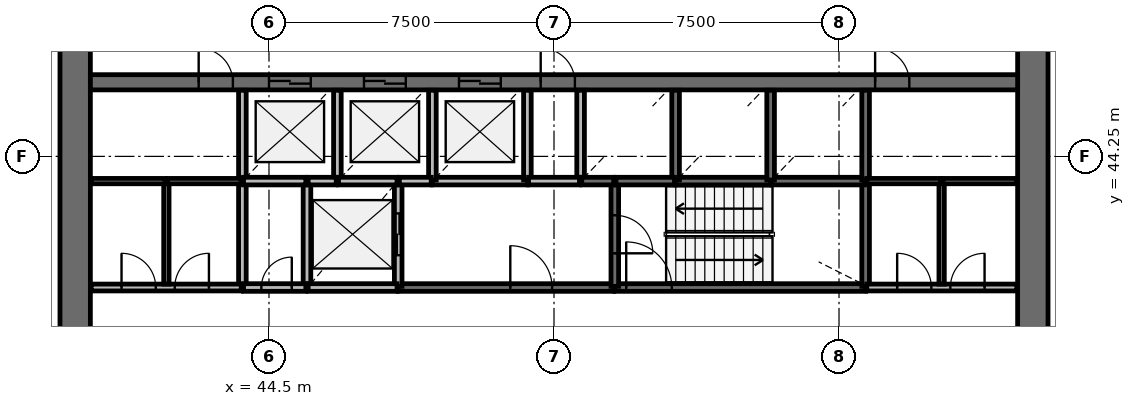
"""IFC4 building model, lengths in metres.
Left out: names, types, materials, properties, quantities, classifications, styles, units other than length and angle.
Written with IfcOpenShell. Run it as: python <this file> out.ifc"""

import sys

from ifc_helpers import new_model, si_unit, direction, frame, frame_2d, origin, place, context, subcontext, project, spatial, rectangle, extrude, source, transform, mapped, element, fill, save


model = new_model("IFC4")
c1 = context("Model", 3, precision=1e-05, world=origin(), true_north=direction((0.0, 1.0)))
c2 = subcontext(c1, "Body", "Model", "MODEL_VIEW")
j1 = project(units=[si_unit("LENGTHUNIT", "METRE"), si_unit("PLANEANGLEUNIT", "RADIAN")], contexts=[c1])
p1 = place(None, origin())
s1 = spatial("IfcSite", under=j1, at=p1, CompositionType="ELEMENT")
p2 = place(p1, origin())
s2 = spatial("IfcBuilding", under=s1, at=p2, CompositionType="ELEMENT")
p3 = place(p2, frame((0.0, 0.0, 116.7)))
s3 = spatial("IfcBuildingStorey", under=s2, at=p3, CompositionType="ELEMENT", Elevation=116.7)
p4 = place(p3, frame((64.6, 38.0, 0.0), z_axis=(0.0, 0.0, 1.0), x_axis=(0.0, 1.0, 0.0)))
e1 = element("IfcWall", 1, at=p4, inside=s3, PredefinedType="SHEAR", context=c2, shape_type="SweptSolid", body=[
    extrude(rectangle(XDim=20.0, YDim=0.8, at=frame_2d((10.0, 0.0))), origin(), (0.0, 0.0, 1.0), 4.1),
])
p5 = place(p4, frame((9.1, 0.0, 0.0)))
e2 = element("IfcOpeningElement", 2, at=p5, cuts=e1, PredefinedType="OPENING", context=c2, shape_type="SweptSolid", body=[
    extrude(rectangle(XDim=1.8, YDim=2.1, at=frame_2d((0.9, 1.05))), frame((0.0, 0.41, 0.0), z_axis=(0.0, -1.0, 0.0), x_axis=(1.0, 0.0, 0.0)), (0.0, 0.0, 1.0), 0.82),
])
p6 = place(p3, frame((39.4, 58.0, 0.0), z_axis=(0.0, 0.0, 1.0), x_axis=(0.0, -1.0, 0.0)))
e3 = element("IfcWall", 3, at=p6, inside=s3, PredefinedType="SHEAR", context=c2, shape_type="SweptSolid", body=[
    extrude(rectangle(XDim=20.0, YDim=0.8, at=frame_2d((10.0, 0.0))), origin(), (0.0, 0.0, 1.0), 4.1),
])
p7 = place(p6, frame((9.1, 0.0, 0.0)))
e4 = element("IfcOpeningElement", 4, at=p7, cuts=e3, PredefinedType="OPENING", context=c2, shape_type="SweptSolid", body=[
    extrude(rectangle(XDim=1.8, YDim=2.1, at=frame_2d((0.9, 1.05))), frame((0.0, 0.41, 0.0), z_axis=(0.0, -1.0, 0.0), x_axis=(1.0, 0.0, 0.0)), (0.0, 0.0, 1.0), 0.82),
])
p8 = place(p3, frame((39.8, 46.2, 0.0), z_axis=(0.0, 0.0, 1.0), x_axis=(1.0, 0.0, 0.0)))
e5 = element("IfcWall", 5, at=p8, inside=s3, PredefinedType="SHEAR", context=c2, shape_type="SweptSolid", body=[
    extrude(rectangle(XDim=24.4, YDim=0.4, at=frame_2d((12.2, 0.0))), origin(), (0.0, 0.0, 1.0), 4.1),
])
p9 = place(p8, frame((4.7, 0.0, 0.0)))
e6 = element("IfcOpeningElement", 6, at=p9, cuts=e5, PredefinedType="OPENING", context=c2, shape_type="SweptSolid", body=[
    extrude(rectangle(XDim=1.1, YDim=2.1, at=frame_2d((0.55, 1.05))), frame((0.0, 0.21, 0.0), z_axis=(0.0, -1.0, 0.0), x_axis=(1.0, 0.0, 0.0)), (0.0, 0.0, 1.0), 0.42),
])
p10 = place(p8, frame((7.2, 0.0, 0.0)))
e7 = element("IfcOpeningElement", 7, at=p10, cuts=e5, PredefinedType="OPENING", context=c2, shape_type="SweptSolid", body=[
    extrude(rectangle(XDim=1.1, YDim=2.1, at=frame_2d((0.55, 1.05))), frame((0.0, 0.21, 0.0), z_axis=(0.0, -1.0, 0.0), x_axis=(1.0, 0.0, 0.0)), (0.0, 0.0, 1.0), 0.42),
])
p11 = place(p8, frame((9.7, 0.0, 0.0)))
e8 = element("IfcOpeningElement", 8, at=p11, cuts=e5, PredefinedType="OPENING", context=c2, shape_type="SweptSolid", body=[
    extrude(rectangle(XDim=1.1, YDim=2.1, at=frame_2d((0.55, 1.05))), frame((0.0, 0.21, 0.0), z_axis=(0.0, -1.0, 0.0), x_axis=(1.0, 0.0, 0.0)), (0.0, 0.0, 1.0), 0.42),
])
p12 = place(p8, frame((20.65, 0.0, 0.0)))
e9 = element("IfcOpeningElement", 9, at=p12, cuts=e5, PredefinedType="OPENING", context=c2, shape_type="SweptSolid", body=[
    extrude(rectangle(XDim=0.9, YDim=2.1, at=frame_2d((0.45, 1.05))), frame((0.0, 0.21, 0.0), z_axis=(0.0, -1.0, 0.0), x_axis=(1.0, 0.0, 0.0)), (0.0, 0.0, 1.0), 0.42),
])
p13 = place(p8, frame((2.85, 0.0, 0.0)))
e10 = element("IfcOpeningElement", 10, at=p13, cuts=e5, PredefinedType="OPENING", context=c2, shape_type="SweptSolid", body=[
    extrude(rectangle(XDim=0.9, YDim=2.1, at=frame_2d((0.45, 1.05))), frame((0.0, 0.21, 0.0), z_axis=(0.0, -1.0, 0.0), x_axis=(1.0, 0.0, 0.0)), (0.0, 0.0, 1.0), 0.42),
])
p14 = place(p8, frame((11.85, 0.0, 0.0)))
e11 = element("IfcOpeningElement", 11, at=p14, cuts=e5, PredefinedType="OPENING", context=c2, shape_type="SweptSolid", body=[
    extrude(rectangle(XDim=0.9, YDim=2.1, at=frame_2d((0.45, 1.05))), frame((0.0, 0.21, 0.0), z_axis=(0.0, -1.0, 0.0), x_axis=(1.0, 0.0, 0.0)), (0.0, 0.0, 1.0), 0.42),
])
p15 = place(p3, frame((53.6, 40.8, 0.0), z_axis=(0.0, 0.0, 1.0), x_axis=(1.0, 0.0, 0.0)))
e12 = element("IfcWall", 12, at=p15, inside=s3, PredefinedType="SOLIDWALL", context=c2, shape_type="SweptSolid", body=[
    extrude(rectangle(XDim=6.6, YDim=0.2, at=frame_2d((3.3, 0.0))), origin(), (0.0, 0.0, 1.0), 3.7),
])
p16 = place(p15, frame((0.3, 0.0, 0.0)))
e13 = element("IfcOpeningElement", 13, at=p16, cuts=e12, PredefinedType="OPENING", context=c2, shape_type="SweptSolid", body=[
    extrude(rectangle(XDim=1.2, YDim=2.1, at=frame_2d((0.6, 1.05))), frame((0.0, 0.11, 0.0), z_axis=(0.0, -1.0, 0.0), x_axis=(1.0, 0.0, 0.0)), (0.0, 0.0, 1.0), 0.22),
])
p17 = place(p3, frame((47.9, 40.8, 0.0), z_axis=(0.0, 0.0, 1.0), x_axis=(1.0, 0.0, 0.0)))
e14 = element("IfcWall", 14, at=p17, inside=s3, PredefinedType="SOLIDWALL", context=c2, shape_type="SweptSolid", body=[
    extrude(rectangle(XDim=5.67, YDim=0.2, at=frame_2d((2.835, 0.0))), origin(), (0.0, 0.0, 1.0), 3.7),
])
p18 = place(p17, frame((2.95, 0.0, 0.0)))
e15 = element("IfcOpeningElement", 15, at=p18, cuts=e14, PredefinedType="OPENING", context=c2, shape_type="SweptSolid", body=[
    extrude(rectangle(XDim=1.1, YDim=2.1, at=frame_2d((0.55, 1.05))), frame((0.0, 0.11, 0.0), z_axis=(0.0, -1.0, 0.0), x_axis=(1.0, 0.0, 0.0)), (0.0, 0.0, 1.0), 0.22),
])
for number, where, z_axis, x_axis in (
    (16, (43.8, 43.6, 0.0), (0.0, 0.0, 1.0), (0.0, -1.0, 0.0)),
    (17, (45.5, 43.6, 0.0), (0.0, 0.0, 1.0), (0.0, -1.0, 0.0)),
):
    element("IfcWall", number, at=place(p3, frame(where, z_axis=z_axis, x_axis=x_axis)), inside=s3, PredefinedType="SOLIDWALL", context=c2, shape_type="SweptSolid", body=[
        extrude(rectangle(XDim=2.8, YDim=0.2, at=frame_2d((1.4, 0.0))), origin(), (0.0, 0.0, 1.0), 3.7),
    ])
p19 = place(p3, frame((47.9, 40.83, 0.0), z_axis=(0.0, 0.0, 1.0), x_axis=(0.0, 1.0, 0.0)))
e18 = element("IfcWall", 18, at=p19, inside=s3, PredefinedType="SOLIDWALL", context=c2, shape_type="SweptSolid", body=[
    extrude(rectangle(XDim=2.77, YDim=0.2, at=frame_2d((1.385, 0.0))), origin(), (0.0, 0.0, 1.0), 3.7),
])
p20 = place(p19, frame((0.82, 0.0, 0.0)))
e19 = element("IfcOpeningElement", 19, at=p20, cuts=e18, PredefinedType="OPENING", context=c2, shape_type="SweptSolid", body=[
    extrude(rectangle(XDim=1.1, YDim=2.1, at=frame_2d((0.55, 1.05))), frame((0.0, 0.11, 0.0), z_axis=(0.0, -1.0, 0.0), x_axis=(1.0, 0.0, 0.0)), (0.0, 0.0, 1.0), 0.22),
])
p21 = place(p3, frame((60.2, 40.83, 0.0), z_axis=(0.0, 0.0, 1.0), x_axis=(0.0, 1.0, 0.0)))
e20 = element("IfcWall", 20, at=p21, inside=s3, PredefinedType="SOLIDWALL", context=c2, shape_type="SweptSolid", body=[
    extrude(rectangle(XDim=2.77, YDim=0.2, at=frame_2d((1.385, 0.0))), origin(), (0.0, 0.0, 1.0), 3.7),
])
p22 = place(p3, frame((53.6, 43.6, 0.0), z_axis=(0.0, 0.0, 1.0), x_axis=(0.0, -1.0, 0.0)))
e21 = element("IfcWall", 21, at=p22, inside=s3, PredefinedType="SOLIDWALL", context=c2, shape_type="SweptSolid", body=[
    extrude(rectangle(XDim=2.77, YDim=0.2, at=frame_2d((1.385, 0.0))), origin(), (0.0, 0.0, 1.0), 3.7),
])
p23 = place(p22, frame((0.9, 0.0, 0.0)))
e22 = element("IfcOpeningElement", 22, at=p23, cuts=e21, PredefinedType="OPENING", context=c2, shape_type="SweptSolid", body=[
    extrude(rectangle(XDim=1.0, YDim=2.1, at=frame_2d((0.5, 1.05))), frame((0.0, 0.11, 0.0), z_axis=(0.0, -1.0, 0.0), x_axis=(1.0, 0.0, 0.0)), (0.0, 0.0, 1.0), 0.22),
])
for number, where, z_axis, x_axis in (
    (23, (48.8, 43.6, 0.0), (0.0, 0.0, 1.0), (1.0, 0.0, 0.0)),
    (24, (55.2, 43.6, 0.0), (0.0, 0.0, 1.0), (1.0, 0.0, 0.0)),
):
    element("IfcWall", number, at=place(p3, frame(where, z_axis=z_axis, x_axis=x_axis)), inside=s3, PredefinedType="SOLIDWALL", context=c2, shape_type="SweptSolid", body=[
        extrude(rectangle(XDim=2.5, YDim=0.2, at=frame_2d((1.25, 0.0))), origin(), (0.0, 0.0, 1.0), 3.7),
    ])
p24 = place(p3, frame((57.73, 43.6, 0.0), z_axis=(0.0, 0.0, 1.0), x_axis=(1.0, 0.0, 0.0)))
e25 = element("IfcWall", 25, at=p24, inside=s3, PredefinedType="SOLIDWALL", context=c2, shape_type="SweptSolid", body=[
    extrude(rectangle(XDim=2.44, YDim=0.2, at=frame_2d((1.22, 0.0))), origin(), (0.0, 0.0, 1.0), 3.7),
])
p25 = place(p3, frame((45.53, 40.8, 0.0), z_axis=(0.0, 0.0, 1.0), x_axis=(1.0, 0.0, 0.0)))
e26 = element("IfcWall", 26, at=p25, inside=s3, PredefinedType="SOLIDWALL", context=c2, shape_type="SweptSolid", body=[
    extrude(rectangle(XDim=2.34, YDim=0.2, at=frame_2d((1.17, 0.0))), origin(), (0.0, 0.0, 1.0), 3.7),
])
p26 = place(p3, frame((43.8, 45.99, 0.0), z_axis=(0.0, 0.0, 1.0), x_axis=(0.0, -1.0, 0.0)))
e27 = element("IfcWall", 27, at=p26, inside=s3, PredefinedType="SOLIDWALL", context=c2, shape_type="SweptSolid", body=[
    extrude(rectangle(XDim=2.36, YDim=0.2, at=frame_2d((1.18, 0.0))), origin(), (0.0, 0.0, 1.0), 3.7),
])
p27 = place(p3, frame((46.3, 43.6, 0.0), z_axis=(0.0, 0.0, 1.0), x_axis=(0.0, 1.0, 0.0)))
e28 = element("IfcWall", 28, at=p27, inside=s3, PredefinedType="SOLIDWALL", context=c2, shape_type="SweptSolid", body=[
    extrude(rectangle(XDim=2.39, YDim=0.2, at=frame_2d((1.195, 0.0))), origin(), (0.0, 0.0, 1.0), 3.7),
])
for number, where, z_axis, x_axis in (
    (29, (48.8, 43.63, 0.0), (0.0, 0.0, 1.0), (0.0, 1.0, 0.0)),
    (30, (51.3, 43.63, 0.0), (0.0, 0.0, 1.0), (0.0, 1.0, 0.0)),
):
    element("IfcWall", number, at=place(p3, frame(where, z_axis=z_axis, x_axis=x_axis)), inside=s3, PredefinedType="SOLIDWALL", context=c2, shape_type="SweptSolid", body=[
        extrude(rectangle(XDim=2.36, YDim=0.2, at=frame_2d((1.18, 0.0))), origin(), (0.0, 0.0, 1.0), 3.7),
    ])
p28 = place(p3, frame((52.7, 45.99, 0.0), z_axis=(0.0, 0.0, 1.0), x_axis=(0.0, -1.0, 0.0)))
e31 = element("IfcWall", 31, at=p28, inside=s3, PredefinedType="SOLIDWALL", context=c2, shape_type="SweptSolid", body=[
    extrude(rectangle(XDim=2.39, YDim=0.2, at=frame_2d((1.195, 0.0))), origin(), (0.0, 0.0, 1.0), 3.7),
])
for number, where, z_axis, x_axis in (
    (32, (55.2, 43.63, 0.0), (0.0, 0.0, 1.0), (0.0, 1.0, 0.0)),
    (33, (57.7, 43.63, 0.0), (0.0, 0.0, 1.0), (0.0, 1.0, 0.0)),
    (34, (60.2, 43.63, 0.0), (0.0, 0.0, 1.0), (0.0, 1.0, 0.0)),
):
    element("IfcWall", number, at=place(p3, frame(where, z_axis=z_axis, x_axis=x_axis)), inside=s3, PredefinedType="SOLIDWALL", context=c2, shape_type="SweptSolid", body=[
        extrude(rectangle(XDim=2.36, YDim=0.2, at=frame_2d((1.18, 0.0))), origin(), (0.0, 0.0, 1.0), 3.7),
    ])
p29 = place(p3, frame((43.83, 43.6, 0.0), z_axis=(0.0, 0.0, 1.0), x_axis=(1.0, 0.0, 0.0)))
e35 = element("IfcWall", 35, at=p29, inside=s3, PredefinedType="SOLIDWALL", context=c2, shape_type="SweptSolid", body=[
    extrude(rectangle(XDim=1.64, YDim=0.2, at=frame_2d((0.82, 0.0))), origin(), (0.0, 0.0, 1.0), 3.7),
])
p30 = place(p3, frame((43.83, 40.8, 0.0), z_axis=(0.0, 0.0, 1.0), x_axis=(1.0, 0.0, 0.0)))
e36 = element("IfcWall", 36, at=p30, inside=s3, PredefinedType="SOLIDWALL", context=c2, shape_type="SweptSolid", body=[
    extrude(rectangle(XDim=1.64, YDim=0.2, at=frame_2d((0.82, 0.0))), origin(), (0.0, 0.0, 1.0), 3.7),
])
p31 = place(p30, frame((0.47, 0.0, 0.0)))
e37 = element("IfcOpeningElement", 37, at=p31, cuts=e36, PredefinedType="OPENING", context=c2, shape_type="SweptSolid", body=[
    extrude(rectangle(XDim=0.8, YDim=2.1, at=frame_2d((0.4, 1.05))), frame((0.0, 0.11, 0.0), z_axis=(0.0, -1.0, 0.0), x_axis=(1.0, 0.0, 0.0)), (0.0, 0.0, 1.0), 0.22),
])
for number, where, z_axis, x_axis in (
    (38, (46.33, 43.6, 0.0), (0.0, 0.0, 1.0), (1.0, 0.0, 0.0)),
    (39, (53.63, 43.6, 0.0), (0.0, 0.0, 1.0), (1.0, 0.0, 0.0)),
):
    element("IfcWall", number, at=place(p3, frame(where, z_axis=z_axis, x_axis=x_axis)), inside=s3, PredefinedType="SOLIDWALL", context=c2, shape_type="SweptSolid", body=[
        extrude(rectangle(XDim=1.54, YDim=0.2, at=frame_2d((0.77, 0.0))), origin(), (0.0, 0.0, 1.0), 3.7),
    ])
p32 = place(p3, frame((52.67, 43.6, 0.0), z_axis=(0.0, 0.0, 1.0), x_axis=(-1.0, 0.0, 0.0)))
e40 = element("IfcWall", 40, at=p32, inside=s3, PredefinedType="SOLIDWALL", context=c2, shape_type="SweptSolid", body=[
    extrude(rectangle(XDim=1.34, YDim=0.2, at=frame_2d((0.67, 0.0))), origin(), (0.0, 0.0, 1.0), 3.7),
])
for number, where, z_axis, x_axis in (
    (41, (47.93, 43.6, 0.0), (0.0, 0.0, 1.0), (1.0, 0.0, 0.0)),
    (42, (52.73, 43.6, 0.0), (0.0, 0.0, 1.0), (1.0, 0.0, 0.0)),
):
    element("IfcWall", number, at=place(p3, frame(where, z_axis=z_axis, x_axis=x_axis)), inside=s3, PredefinedType="SOLIDWALL", context=c2, shape_type="SweptSolid", body=[
        extrude(rectangle(XDim=0.84, YDim=0.2, at=frame_2d((0.42, 0.0))), origin(), (0.0, 0.0, 1.0), 3.7),
    ])
p33 = place(p3, frame((45.53, 43.6, 0.0), z_axis=(0.0, 0.0, 1.0), x_axis=(1.0, 0.0, 0.0)))
e43 = element("IfcWall", 43, at=p33, inside=s3, PredefinedType="SOLIDWALL", context=c2, shape_type="SweptSolid", body=[
    extrude(rectangle(XDim=0.74, YDim=0.2, at=frame_2d((0.37, 0.0))), origin(), (0.0, 0.0, 1.0), 3.7),
])
p34 = place(p3, frame((60.23, 40.8, 0.0), z_axis=(0.0, 0.0, 1.0), x_axis=(1.0, 0.0, 0.0)))
e44 = element("IfcWall", 44, at=p34, inside=s3, PredefinedType="PARTITIONING", context=c2, shape_type="SweptSolid", body=[
    extrude(rectangle(XDim=3.95, YDim=0.18, at=frame_2d((1.975, 0.0))), origin(), (0.0, 0.0, 1.0), 3.7),
])
p35 = place(p34, frame((0.8, 0.0, 0.0)))
e45 = element("IfcOpeningElement", 45, at=p35, cuts=e44, PredefinedType="OPENING", context=c2, shape_type="SweptSolid", body=[
    extrude(rectangle(XDim=0.9, YDim=2.1, at=frame_2d((0.45, 1.05))), frame((0.0, 0.1, 0.0), z_axis=(0.0, -1.0, 0.0), x_axis=(1.0, 0.0, 0.0)), (0.0, 0.0, 1.0), 0.2),
])
p36 = place(p34, frame((2.2, 0.0, 0.0)))
e46 = element("IfcOpeningElement", 46, at=p36, cuts=e44, PredefinedType="OPENING", context=c2, shape_type="SweptSolid", body=[
    extrude(rectangle(XDim=0.9, YDim=2.1, at=frame_2d((0.45, 1.05))), frame((0.0, 0.1, 0.0), z_axis=(0.0, -1.0, 0.0), x_axis=(1.0, 0.0, 0.0)), (0.0, 0.0, 1.0), 0.2),
])
p37 = place(p3, frame((39.82, 40.8, 0.0), z_axis=(0.0, 0.0, 1.0), x_axis=(1.0, 0.0, 0.0)))
e47 = element("IfcWall", 47, at=p37, inside=s3, PredefinedType="PARTITIONING", context=c2, shape_type="SweptSolid", body=[
    extrude(rectangle(XDim=3.95, YDim=0.18, at=frame_2d((1.975, 0.0))), origin(), (0.0, 0.0, 1.0), 3.7),
])
p38 = place(p37, frame((0.8, 0.0, 0.0)))
e48 = element("IfcOpeningElement", 48, at=p38, cuts=e47, PredefinedType="OPENING", context=c2, shape_type="SweptSolid", body=[
    extrude(rectangle(XDim=0.9, YDim=2.1, at=frame_2d((0.45, 1.05))), frame((0.0, 0.1, 0.0), z_axis=(0.0, -1.0, 0.0), x_axis=(1.0, 0.0, 0.0)), (0.0, 0.0, 1.0), 0.2),
])
p39 = place(p37, frame((2.2, 0.0, 0.0)))
e49 = element("IfcOpeningElement", 49, at=p39, cuts=e47, PredefinedType="OPENING", context=c2, shape_type="SweptSolid", body=[
    extrude(rectangle(XDim=0.9, YDim=2.1, at=frame_2d((0.45, 1.05))), frame((0.0, 0.1, 0.0), z_axis=(0.0, -1.0, 0.0), x_axis=(1.0, 0.0, 0.0)), (0.0, 0.0, 1.0), 0.2),
])
for number, where, z_axis, x_axis in (
    (50, (41.8, 40.89, 0.0), (0.0, 0.0, 1.0), (0.0, 1.0, 0.0)),
    (51, (62.2, 40.89, 0.0), (0.0, 0.0, 1.0), (0.0, 1.0, 0.0)),
):
    element("IfcWall", number, at=place(p3, frame(where, z_axis=z_axis, x_axis=x_axis)), inside=s3, PredefinedType="PARTITIONING", context=c2, shape_type="SweptSolid", body=[
        extrude(rectangle(XDim=2.71, YDim=0.14, at=frame_2d((1.355, 0.0))), origin(), (0.0, 0.0, 1.0), 2.9),
    ])
for number, where, z_axis, x_axis in (
    (52, (43.77, 43.6, 0.0), (0.0, 0.0, 1.0), (-1.0, 0.0, 0.0)),
    (53, (60.23, 43.6, 0.0), (0.0, 0.0, 1.0), (1.0, 0.0, 0.0)),
):
    element("IfcWall", number, at=place(p3, frame(where, z_axis=z_axis, x_axis=x_axis)), inside=s3, PredefinedType="PARTITIONING", context=c2, shape_type="SweptSolid", body=[
        extrude(rectangle(XDim=1.94, YDim=0.14, at=frame_2d((0.97, 0.0))), origin(), (0.0, 0.0, 1.0), 2.9),
    ])
for number, where, z_axis, x_axis in (
    (54, (62.23, 43.6, 0.0), (0.0, 0.0, 1.0), (1.0, 0.0, 0.0)),
    (55, (41.77, 43.6, 0.0), (0.0, 0.0, 1.0), (-1.0, 0.0, 0.0)),
):
    element("IfcWall", number, at=place(p3, frame(where, z_axis=z_axis, x_axis=x_axis)), inside=s3, PredefinedType="PARTITIONING", context=c2, shape_type="SweptSolid", body=[
        extrude(rectangle(XDim=1.95, YDim=0.14, at=frame_2d((0.975, 0.0))), origin(), (0.0, 0.0, 1.0), 2.9),
    ])
m1 = source(origin(), c2, "Body", "SweptSolid", [
    extrude(rectangle(XDim=1.1, YDim=2.1, at=frame_2d((0.55, 1.05))), frame((0.0, 0.025, 0.0), z_axis=(0.0, -1.0, 0.0), x_axis=(1.0, 0.0, 0.0)), (0.0, 0.0, 1.0), 0.05),
])
p40 = place(p9, origin())
e56 = element("IfcDoor", 56, at=p40, inside=s3, OperationType="DOUBLE_DOOR_SLIDING", PredefinedType="USERDEFINED", context=c2, shape_type="MappedRepresentation", body=[
    mapped(m1, transform((0.0, 0.0, 0.0), scale=1.0)),
])
fill(e6, e56)
p41 = place(p10, origin())
e57 = element("IfcDoor", 57, at=p41, inside=s3, OperationType="DOUBLE_DOOR_SLIDING", PredefinedType="USERDEFINED", context=c2, shape_type="MappedRepresentation", body=[
    mapped(m1, transform((0.0, 0.0, 0.0), scale=1.0)),
])
fill(e7, e57)
p42 = place(p11, origin())
e58 = element("IfcDoor", 58, at=p42, inside=s3, OperationType="DOUBLE_DOOR_SLIDING", PredefinedType="USERDEFINED", context=c2, shape_type="MappedRepresentation", body=[
    mapped(m1, transform((0.0, 0.0, 0.0), scale=1.0)),
])
fill(e8, e58)
p43 = place(p20, origin())
e59 = element("IfcDoor", 59, at=p43, inside=s3, OperationType="DOUBLE_DOOR_SLIDING", PredefinedType="USERDEFINED", context=c2, shape_type="MappedRepresentation", body=[
    mapped(m1, transform((0.0, 0.0, 0.0), scale=1.0)),
])
fill(e19, e59)
m2 = source(origin(), c2, "Body", "SweptSolid", [
    extrude(rectangle(XDim=1.2, YDim=2.1, at=frame_2d((0.6, 1.05))), frame((0.0, 0.025, 0.0), z_axis=(0.0, -1.0, 0.0), x_axis=(1.0, 0.0, 0.0)), (0.0, 0.0, 1.0), 0.05),
])
p44 = place(p16, origin())
e60 = element("IfcDoor", 60, at=p44, inside=s3, OperationType="SINGLE_SWING_LEFT", PredefinedType="DOOR", context=c2, shape_type="MappedRepresentation", body=[
    mapped(m2, transform((0.0, 0.0, 0.0), scale=1.0)),
])
fill(e13, e60)
m3 = source(origin(), c2, "Body", "SweptSolid", [
    extrude(rectangle(XDim=1.0, YDim=2.1, at=frame_2d((0.5, 1.05))), frame((0.0, 0.025, 0.0), z_axis=(0.0, -1.0, 0.0), x_axis=(1.0, 0.0, 0.0)), (0.0, 0.0, 1.0), 0.05),
])
p45 = place(p23, origin())
e61 = element("IfcDoor", 61, at=p45, inside=s3, OperationType="SINGLE_SWING_RIGHT", PredefinedType="DOOR", context=c2, shape_type="MappedRepresentation", body=[
    mapped(m3, transform((0.0, 0.0, 0.0), scale=1.0)),
])
fill(e22, e61)
m4 = source(origin(), c2, "Body", "SweptSolid", [
    extrude(rectangle(XDim=1.1, YDim=2.1, at=frame_2d((0.55, 1.05))), frame((0.0, 0.025, 0.0), z_axis=(0.0, -1.0, 0.0), x_axis=(1.0, 0.0, 0.0)), (0.0, 0.0, 1.0), 0.05),
])
p46 = place(p18, origin())
e62 = element("IfcDoor", 62, at=p46, inside=s3, OperationType="SINGLE_SWING_LEFT", PredefinedType="DOOR", context=c2, shape_type="MappedRepresentation", body=[
    mapped(m4, transform((0.0, 0.0, 0.0), scale=1.0)),
])
fill(e15, e62)
m5 = source(origin(), c2, "Body", "SweptSolid", [
    extrude(rectangle(XDim=0.8, YDim=2.1, at=frame_2d((0.4, 1.05))), frame((0.0, 0.025, 0.0), z_axis=(0.0, -1.0, 0.0), x_axis=(1.0, 0.0, 0.0)), (0.0, 0.0, 1.0), 0.05),
])
p47 = place(p31, origin())
e63 = element("IfcDoor", 63, at=p47, inside=s3, OperationType="SINGLE_SWING_RIGHT", PredefinedType="DOOR", context=c2, shape_type="MappedRepresentation", body=[
    mapped(m5, transform((0.0, 0.0, 0.0), scale=1.0)),
])
fill(e37, e63)
m6 = source(origin(), c2, "Body", "SweptSolid", [
    extrude(rectangle(XDim=0.9, YDim=2.1, at=frame_2d((0.45, 1.05))), frame((0.0, 0.025, 0.0), z_axis=(0.0, -1.0, 0.0), x_axis=(1.0, 0.0, 0.0)), (0.0, 0.0, 1.0), 0.05),
])
p48 = place(p38, origin())
e64 = element("IfcDoor", 64, at=p48, inside=s3, OperationType="SINGLE_SWING_LEFT", PredefinedType="DOOR", context=c2, shape_type="MappedRepresentation", body=[
    mapped(m6, transform((0.0, 0.0, 0.0), scale=1.0)),
])
fill(e48, e64)
p49 = place(p39, origin())
e65 = element("IfcDoor", 65, at=p49, inside=s3, OperationType="SINGLE_SWING_RIGHT", PredefinedType="DOOR", context=c2, shape_type="MappedRepresentation", body=[
    mapped(m6, transform((0.0, 0.0, 0.0), scale=1.0)),
])
fill(e49, e65)
p50 = place(p12, origin())
e66 = element("IfcDoor", 66, at=p50, inside=s3, OperationType="SINGLE_SWING_LEFT", PredefinedType="DOOR", context=c2, shape_type="MappedRepresentation", body=[
    mapped(m6, transform((0.0, 0.0, 0.0), scale=1.0)),
])
fill(e9, e66)
p51 = place(p35, origin())
e67 = element("IfcDoor", 67, at=p51, inside=s3, OperationType="SINGLE_SWING_LEFT", PredefinedType="DOOR", context=c2, shape_type="MappedRepresentation", body=[
    mapped(m6, transform((0.0, 0.0, 0.0), scale=1.0)),
])
fill(e45, e67)
p52 = place(p36, origin())
e68 = element("IfcDoor", 68, at=p52, inside=s3, OperationType="SINGLE_SWING_RIGHT", PredefinedType="DOOR", context=c2, shape_type="MappedRepresentation", body=[
    mapped(m6, transform((0.0, 0.0, 0.0), scale=1.0)),
])
fill(e46, e68)
p53 = place(p13, origin())
e69 = element("IfcDoor", 69, at=p53, inside=s3, OperationType="SINGLE_SWING_LEFT", PredefinedType="DOOR", context=c2, shape_type="MappedRepresentation", body=[
    mapped(m6, transform((0.0, 0.0, 0.0), scale=1.0)),
])
fill(e10, e69)
p54 = place(p14, origin())
e70 = element("IfcDoor", 70, at=p54, inside=s3, OperationType="SINGLE_SWING_LEFT", PredefinedType="DOOR", context=c2, shape_type="MappedRepresentation", body=[
    mapped(m6, transform((0.0, 0.0, 0.0), scale=1.0)),
])
fill(e11, e70)
save(model, sys.argv[1])
